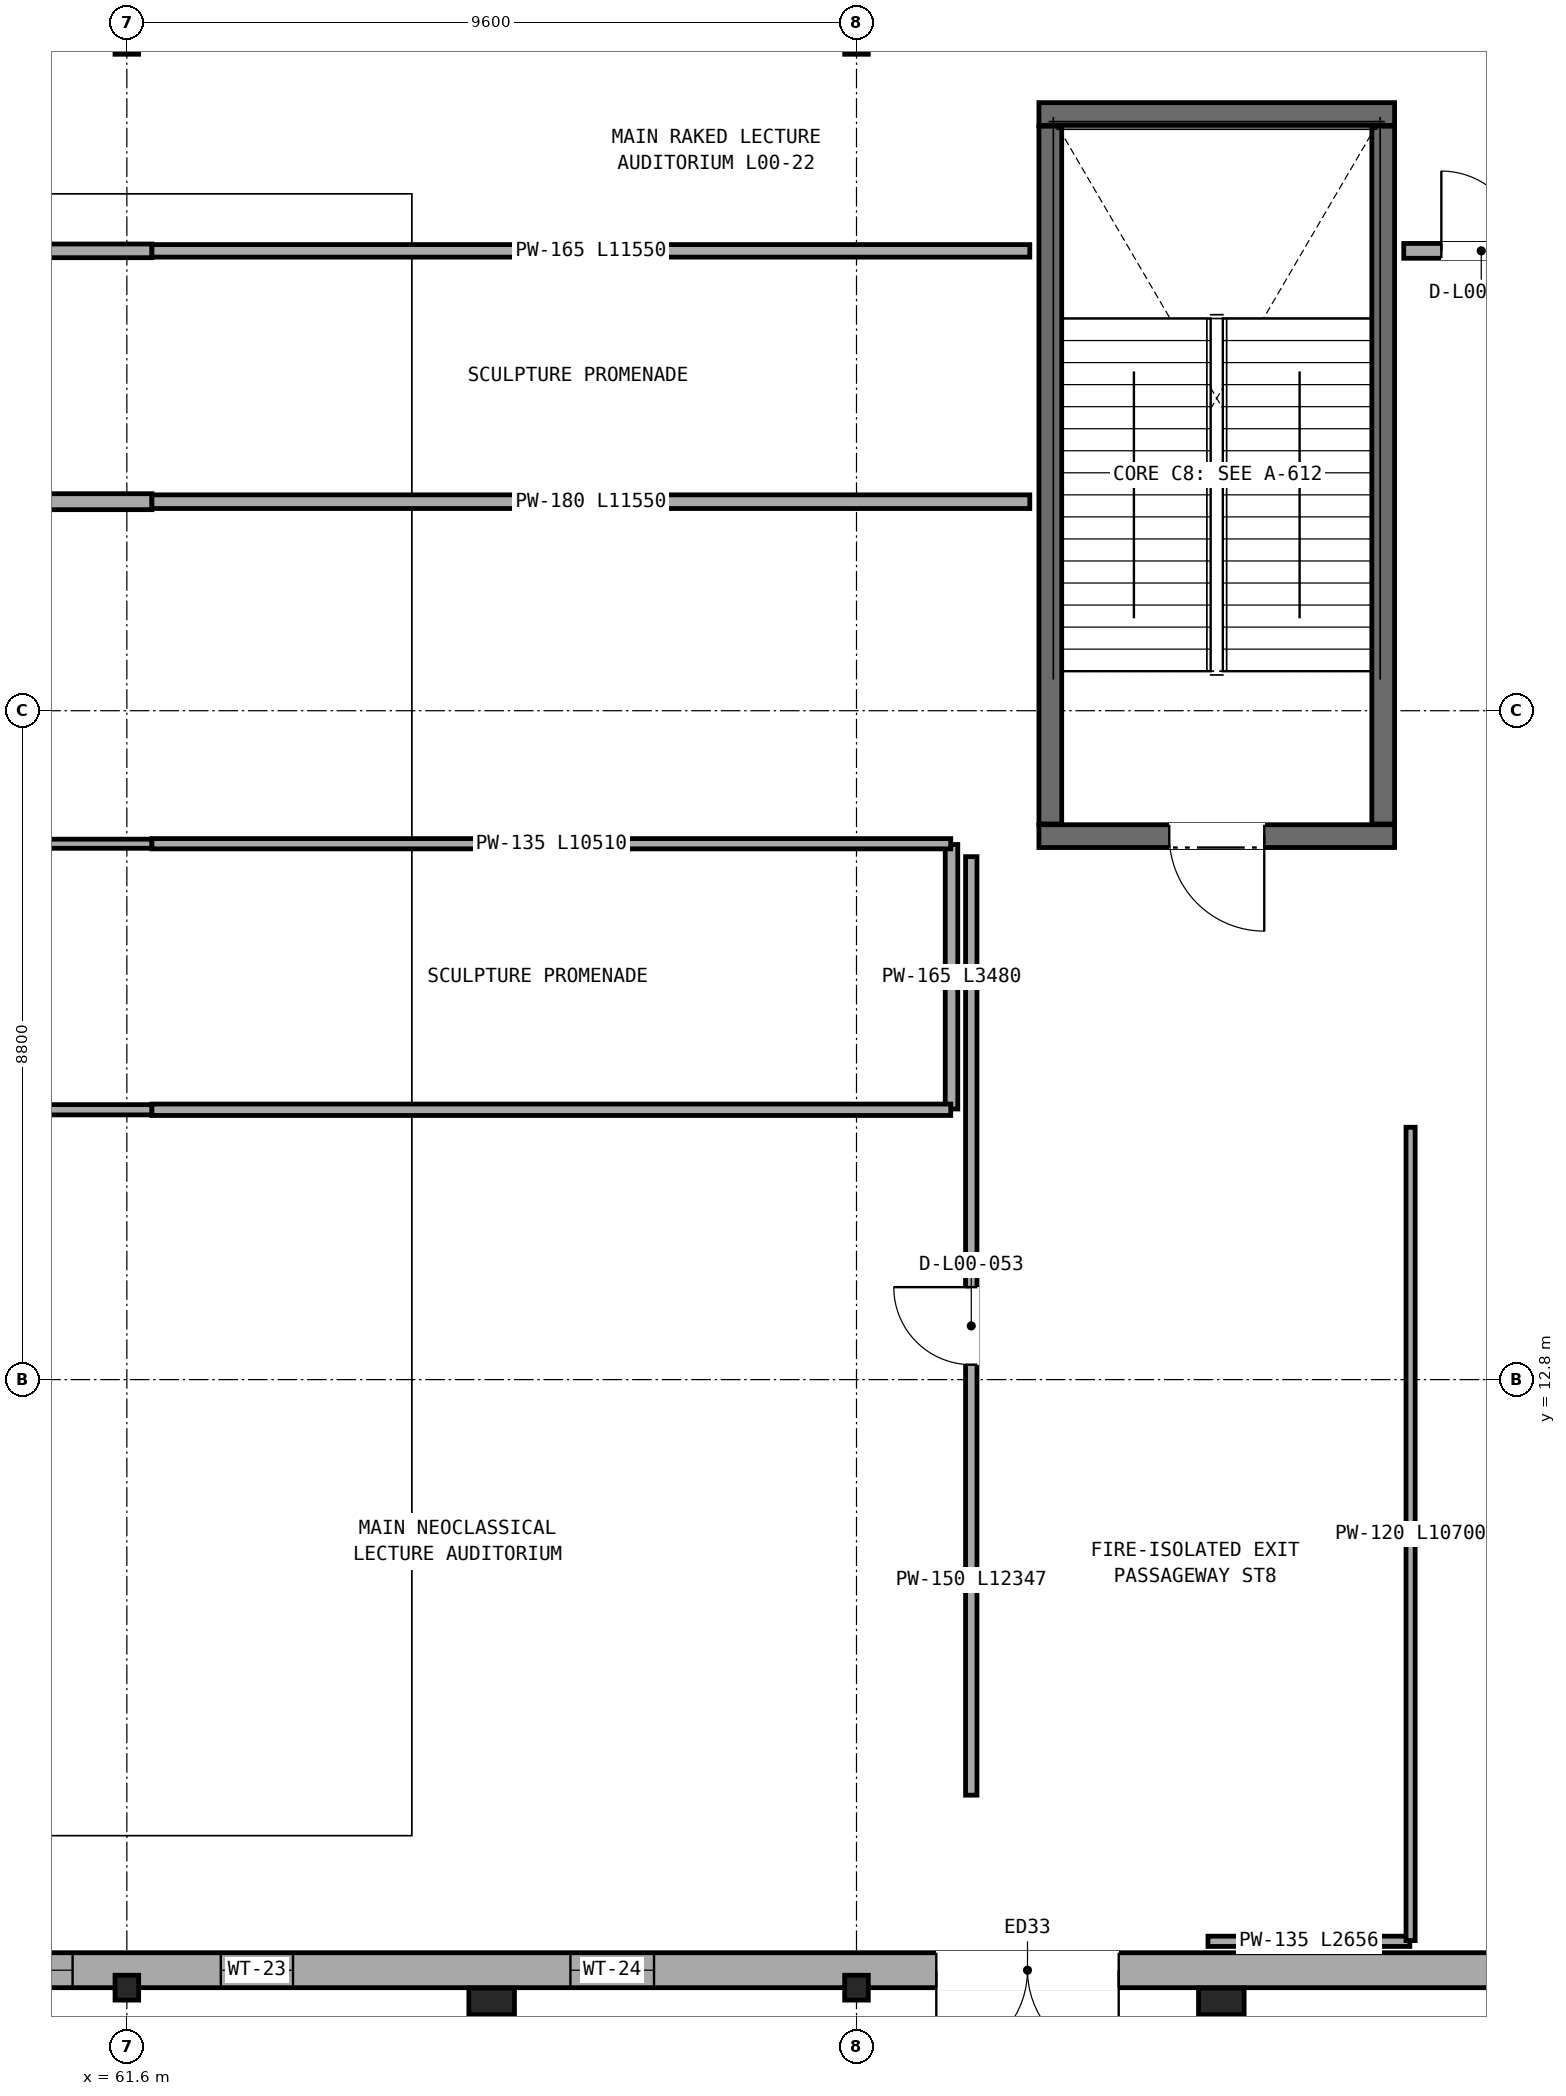
"""IFC4 building model, lengths in metres.
Left out: names, types, materials, properties, quantities, classifications, styles, units other than length and angle.
Written with IfcOpenShell. Run it as: python <this file> out.ifc"""

import sys

from ifc_helpers import new_model, si_unit, direction, frame, frame_2d, origin, origin_2d, place, context, subcontext, project, spatial, rectangle, i_section, extrude, element, fill, save


model = new_model("IFC4")
c1 = context("Model", 3, precision=1e-05, world=origin(), true_north=direction((0.0, 1.0)))
c2 = subcontext(c1, "Body", "Model", "MODEL_VIEW")
j1 = project(units=[si_unit("LENGTHUNIT", "METRE"), si_unit("PLANEANGLEUNIT", "RADIAN")], contexts=[c1])
p1 = place(None, origin())
s1 = spatial("IfcSite", under=j1, at=p1, CompositionType="ELEMENT")
p2 = place(p1, origin())
s2 = spatial("IfcBuilding", under=s1, at=p2, CompositionType="ELEMENT")
p3 = place(p2, origin())
s3 = spatial("IfcBuildingStorey", under=s2, at=p3, CompositionType="ELEMENT", Elevation=0.0)
for number, where, z_axis, x_axis in (
    (1, (61.6, 4.8, 0.0), (0.0, 0.0, 1.0), (1.0, 0.0, 0.0)),
    (2, (61.6, 30.4, 0.0), (0.0, 0.0, 1.0), (1.0, 0.0, 0.0)),
    (3, (71.2, 4.8, 0.0), (0.0, 0.0, 1.0), (1.0, 0.0, 0.0)),
    (4, (71.2, 30.4, 0.0), (0.0, 0.0, 1.0), (1.0, 0.0, 0.0)),
):
    element("IfcColumn", number, at=place(p3, frame(where, z_axis=z_axis, x_axis=x_axis)), inside=s3, PredefinedType="COLUMN", context=c2, shape_type="SweptSolid", body=[
        extrude(i_section(OverallWidth=0.311, OverallDepth=0.327, WebThickness=0.016, FlangeThickness=0.025, FilletRadius=0.017, at=origin_2d()), origin(), (0.0, 0.0, 1.0), 5.6),
    ])
for number, where, z_axis, x_axis in (
    (5, (66.4, 4.62, 0.0), (0.0, 0.0, 1.0), (1.0, 0.0, 0.0)),
    (6, (76.0, 4.62, 0.0), (0.0, 0.0, 1.0), (1.0, 0.0, 0.0)),
):
    element("IfcColumn", number, at=place(p3, frame(where, z_axis=z_axis, x_axis=x_axis)), inside=s3, PredefinedType="PILASTER", context=c2, shape_type="SweptSolid", body=[
        extrude(rectangle(XDim=0.6, YDim=0.35, at=origin_2d()), origin(), (0.0, 0.0, 1.0), 5.6),
    ])
p4 = place(p3, frame((42.636, 5.03, 0.0), z_axis=(0.0, 0.0, 1.0), x_axis=(1.0, 0.0, 0.0)))
e7 = element("IfcWall", 7, at=p4, inside=s3, PredefinedType="SOLIDWALL", context=c2, shape_type="SweptSolid", body=[
    extrude(rectangle(XDim=37.928, YDim=0.46, at=frame_2d((18.964, 0.0))), origin(), (0.0, 0.0, 1.0), 4.802),
])
p5 = place(p4, frame((29.614, 0.0, 0.0)))
e8 = element("IfcOpeningElement", 8, at=p5, cuts=e7, PredefinedType="OPENING", context=c2, shape_type="SweptSolid", body=[
    extrude(rectangle(XDim=2.4, YDim=2.45, at=frame_2d((1.2, 1.225))), frame((0.0, 0.24, 0.0), z_axis=(0.0, -1.0, 0.0), x_axis=(1.0, 0.0, 0.0)), (0.0, 0.0, 1.0), 0.48),
])
p6 = place(p4, frame((1.8, 0.0, 0.9)))
e9 = element("IfcOpeningElement", 9, at=p6, cuts=e7, PredefinedType="OPENING", context=c2, shape_type="SweptSolid", body=[
    extrude(rectangle(XDim=2.12, YDim=1.85, at=frame_2d((1.06, 0.925))), frame((0.0, 0.24, 0.0), z_axis=(0.0, -1.0, 0.0), x_axis=(1.0, 0.0, 0.0)), (0.0, 0.0, 1.0), 0.48),
])
p7 = place(p4, frame((6.4, 0.0, 0.9)))
e10 = element("IfcOpeningElement", 10, at=p7, cuts=e7, PredefinedType="OPENING", context=c2, shape_type="SweptSolid", body=[
    extrude(rectangle(XDim=2.2, YDim=1.85, at=frame_2d((1.1, 0.925))), frame((0.0, 0.24, 0.0), z_axis=(0.0, -1.0, 0.0), x_axis=(1.0, 0.0, 0.0)), (0.0, 0.0, 1.0), 0.48),
])
p8 = place(p4, frame((11.0, 0.0, 0.9)))
e11 = element("IfcOpeningElement", 11, at=p8, cuts=e7, PredefinedType="OPENING", context=c2, shape_type="SweptSolid", body=[
    extrude(rectangle(XDim=2.4, YDim=1.85, at=frame_2d((1.2, 0.925))), frame((0.0, 0.24, 0.0), z_axis=(0.0, -1.0, 0.0), x_axis=(1.0, 0.0, 0.0)), (0.0, 0.0, 1.0), 0.48),
])
p9 = place(p4, frame((15.6, 0.0, 0.9)))
e12 = element("IfcOpeningElement", 12, at=p9, cuts=e7, PredefinedType="OPENING", context=c2, shape_type="SweptSolid", body=[
    extrude(rectangle(XDim=2.65, YDim=1.85, at=frame_2d((1.325, 0.925))), frame((0.0, 0.24, 0.0), z_axis=(0.0, -1.0, 0.0), x_axis=(1.0, 0.0, 0.0)), (0.0, 0.0, 1.0), 0.48),
])
p10 = place(p4, frame((20.2, 0.0, 0.9)))
e13 = element("IfcOpeningElement", 13, at=p10, cuts=e7, PredefinedType="OPENING", context=c2, shape_type="SweptSolid", body=[
    extrude(rectangle(XDim=0.95, YDim=2.15, at=frame_2d((0.475, 1.075))), frame((0.0, 0.24, 0.0), z_axis=(0.0, -1.0, 0.0), x_axis=(1.0, 0.0, 0.0)), (0.0, 0.0, 1.0), 0.48),
])
p11 = place(p4, frame((24.8, 0.0, 0.9)))
e14 = element("IfcOpeningElement", 14, at=p11, cuts=e7, PredefinedType="OPENING", context=c2, shape_type="SweptSolid", body=[
    extrude(rectangle(XDim=1.1, YDim=2.15, at=frame_2d((0.55, 1.075))), frame((0.0, 0.24, 0.0), z_axis=(0.0, -1.0, 0.0), x_axis=(1.0, 0.0, 0.0)), (0.0, 0.0, 1.0), 0.48),
])
p12 = place(p3, frame((73.6, 19.95, 0.0), z_axis=(0.0, 0.0, 1.0), x_axis=(1.0, 0.0, 0.0)))
e15 = element("IfcWall", 15, at=p12, inside=s3, PredefinedType="SHEAR", context=c2, shape_type="SweptSolid", body=[
    extrude(rectangle(XDim=4.68, YDim=0.3, at=frame_2d((2.34, 0.0))), origin(), (0.0, 0.0, 1.0), 5.345),
])
p13 = place(p12, frame((1.715, 0.0, 0.0)))
e16 = element("IfcOpeningElement", 16, at=p13, cuts=e15, PredefinedType="OPENING", context=c2, shape_type="SweptSolid", body=[
    extrude(rectangle(XDim=1.25, YDim=2.2, at=frame_2d((0.625, 1.1))), frame((0.0, 0.16, 0.0), z_axis=(0.0, -1.0, 0.0), x_axis=(1.0, 0.0, 0.0)), (0.0, 0.0, 1.0), 0.32),
])
p14 = place(p3, frame((78.28, 29.45, 0.0), z_axis=(0.0, 0.0, 1.0), x_axis=(-1.0, 0.0, 0.0)))
e17 = element("IfcWall", 17, at=p14, inside=s3, PredefinedType="SHEAR", context=c2, shape_type="SweptSolid", body=[
    extrude(rectangle(XDim=4.68, YDim=0.3, at=frame_2d((2.34, 0.0))), origin(), (0.0, 0.0, 1.0), 5.345),
])
for number, where, z_axis, x_axis in (
    (18, (78.13, 20.11, 0.0), (0.0, 0.0, 1.0), (0.0, 1.0, 0.0)),
    (19, (73.75, 29.29, 0.0), (0.0, 0.0, 1.0), (0.0, -1.0, 0.0)),
):
    element("IfcWall", number, at=place(p3, frame(where, z_axis=z_axis, x_axis=x_axis)), inside=s3, PredefinedType="SHEAR", context=c2, shape_type="SweptSolid", body=[
        extrude(rectangle(XDim=9.18, YDim=0.3, at=frame_2d((4.59, 0.0))), origin(), (0.0, 0.0, 1.0), 5.345),
    ])
p15 = place(p3, frame((72.45, 16.36, 0.0), z_axis=(0.0, 0.0, 1.0), x_axis=(0.0, 1.0, 0.0)))
e20 = element("IfcWall", 20, at=p15, inside=s3, PredefinedType="PARTITIONING", context=c2, shape_type="SweptSolid", body=[
    extrude(rectangle(XDim=3.48, YDim=0.165, at=frame_2d((1.74, 0.0))), origin(), (0.0, 0.0, 1.0), 5.23),
])
p16 = place(p3, frame((72.71, 19.68, 0.0), z_axis=(0.0, 0.0, 1.0), x_axis=(0.0, -1.0, 0.0)))
e21 = element("IfcWall", 21, at=p16, inside=s3, PredefinedType="PARTITIONING", context=c2, shape_type="SweptSolid", body=[
    extrude(rectangle(XDim=12.347, YDim=0.15, at=frame_2d((6.174, 0.0))), origin(), (0.0, 0.0, 1.0), 5.23),
])
p17 = place(p16, frame((5.664, 0.0, 0.0)))
e22 = element("IfcOpeningElement", 22, at=p17, cuts=e21, PredefinedType="OPENING", context=c2, shape_type="SweptSolid", body=[
    extrude(rectangle(XDim=1.02, YDim=2.24, at=frame_2d((0.51, 1.12))), frame((0.0, 0.085, 0.0), z_axis=(0.0, -1.0, 0.0), x_axis=(1.0, 0.0, 0.0)), (0.0, 0.0, 1.0), 0.17),
])
p18 = place(p3, frame((75.824, 5.41, 0.0), z_axis=(0.0, 0.0, 1.0), x_axis=(1.0, 0.0, 0.0)))
e23 = element("IfcWall", 23, at=p18, inside=s3, PredefinedType="PARTITIONING", context=c2, shape_type="SweptSolid", body=[
    extrude(rectangle(XDim=2.656, YDim=0.135, at=frame_2d((1.328, 0.0))), origin(), (0.0, 0.0, 1.0), 5.23),
])
p19 = place(p3, frame((78.49, 5.42, 0.0), z_axis=(0.0, 0.0, 1.0), x_axis=(0.0, 1.0, 0.0)))
e24 = element("IfcWall", 24, at=p19, inside=s3, PredefinedType="PARTITIONING", context=c2, shape_type="SweptSolid", body=[
    extrude(rectangle(XDim=10.7, YDim=0.12, at=frame_2d((5.35, 0.0))), origin(), (0.0, 0.0, 1.0), 5.23),
])
p20 = place(p3, frame((42.76, 16.35, 0.0), z_axis=(0.0, 0.0, 1.0), x_axis=(1.0, 0.0, 0.0)))
e25 = element("IfcWall", 25, at=p20, inside=s3, PredefinedType="PARTITIONING", context=c2, shape_type="SweptSolid", body=[
    extrude(rectangle(XDim=19.17, YDim=0.135, at=frame_2d((9.585, 0.0))), origin(), (0.0, 0.0, 1.0), 5.23),
])
p21 = place(p3, frame((61.93, 19.85, 0.0), z_axis=(0.0, 0.0, 1.0), x_axis=(-1.0, 0.0, 0.0)))
e26 = element("IfcWall", 26, at=p21, inside=s3, PredefinedType="PARTITIONING", context=c2, shape_type="SweptSolid", body=[
    extrude(rectangle(XDim=19.17, YDim=0.12, at=frame_2d((9.585, 0.0))), origin(), (0.0, 0.0, 1.0), 5.23),
])
p22 = place(p3, frame((42.76, 24.35, 0.0), z_axis=(0.0, 0.0, 1.0), x_axis=(1.0, 0.0, 0.0)))
e27 = element("IfcWall", 27, at=p22, inside=s3, PredefinedType="PARTITIONING", context=c2, shape_type="SweptSolid", body=[
    extrude(rectangle(XDim=19.17, YDim=0.21, at=frame_2d((9.585, 0.0))), origin(), (0.0, 0.0, 1.0), 5.23),
])
p23 = place(p3, frame((80.44, 27.65, 0.0), z_axis=(0.0, 0.0, 1.0), x_axis=(-1.0, 0.0, 0.0)))
e28 = element("IfcWall", 28, at=p23, inside=s3, PredefinedType="PARTITIONING", context=c2, shape_type="SweptSolid", body=[
    extrude(rectangle(XDim=2.04, YDim=0.195, at=frame_2d((1.02, 0.0))), origin(), (0.0, 0.0, 1.0), 5.23),
])
p24 = place(p23, frame((0.495, 0.0, 0.0)))
e29 = element("IfcOpeningElement", 29, at=p24, cuts=e28, PredefinedType="OPENING", context=c2, shape_type="SweptSolid", body=[
    extrude(rectangle(XDim=1.05, YDim=2.15, at=frame_2d((0.525, 1.075))), frame((0.0, 0.107, 0.0), z_axis=(0.0, -1.0, 0.0), x_axis=(1.0, 0.0, 0.0)), (0.0, 0.0, 1.0), 0.215),
])
p25 = place(p3, frame((61.93, 27.65, 0.0), z_axis=(0.0, 0.0, 1.0), x_axis=(-1.0, 0.0, 0.0)))
e30 = element("IfcWall", 30, at=p25, inside=s3, PredefinedType="PARTITIONING", context=c2, shape_type="SweptSolid", body=[
    extrude(rectangle(XDim=19.17, YDim=0.18, at=frame_2d((9.585, 0.0))), origin(), (0.0, 0.0, 1.0), 5.23),
])
p26 = place(p3, frame((61.93, 24.35, 0.0), z_axis=(0.0, 0.0, 1.0), x_axis=(1.0, 0.0, 0.0)))
e31 = element("IfcWall", 31, at=p26, inside=s3, PredefinedType="PARTITIONING", context=c2, shape_type="SweptSolid", body=[
    extrude(rectangle(XDim=11.55, YDim=0.18, at=frame_2d((5.775, 0.0))), origin(), (0.0, 0.0, 1.0), 5.23),
])
p27 = place(p3, frame((73.48, 27.65, 0.0), z_axis=(0.0, 0.0, 1.0), x_axis=(-1.0, 0.0, 0.0)))
e32 = element("IfcWall", 32, at=p27, inside=s3, PredefinedType="PARTITIONING", context=c2, shape_type="SweptSolid", body=[
    extrude(rectangle(XDim=11.55, YDim=0.165, at=frame_2d((5.775, 0.0))), origin(), (0.0, 0.0, 1.0), 5.23),
])
p28 = place(p3, frame((61.93, 16.35, 0.0), z_axis=(0.0, 0.0, 1.0), x_axis=(1.0, 0.0, 0.0)))
e33 = element("IfcWall", 33, at=p28, inside=s3, PredefinedType="PARTITIONING", context=c2, shape_type="SweptSolid", body=[
    extrude(rectangle(XDim=10.51, YDim=0.15, at=frame_2d((5.255, 0.0))), origin(), (0.0, 0.0, 1.0), 5.23),
])
p29 = place(p3, frame((72.44, 19.85, 0.0), z_axis=(0.0, 0.0, 1.0), x_axis=(-1.0, 0.0, 0.0)))
e34 = element("IfcWall", 34, at=p29, inside=s3, PredefinedType="PARTITIONING", context=c2, shape_type="SweptSolid", body=[
    extrude(rectangle(XDim=10.51, YDim=0.135, at=frame_2d((5.255, 0.0))), origin(), (0.0, 0.0, 1.0), 5.23),
])
p30 = place(p5, frame((2.4, 0.0, 0.0), z_axis=(0.0, 0.0, 1.0), x_axis=(-1.0, 0.0, 0.0)))
e35 = element("IfcDoor", 35, at=p30, inside=s3, OperationType="DOUBLE_DOOR_SINGLE_SWING", PredefinedType="DOOR", context=c2, shape_type="SweptSolid", body=[
    extrude(rectangle(XDim=2.4, YDim=2.45, at=frame_2d((1.2, 1.225))), frame((0.0, 0.025, 0.0), z_axis=(0.0, -1.0, 0.0), x_axis=(1.0, 0.0, 0.0)), (0.0, 0.0, 1.0), 0.05),
])
fill(e8, e35)
p31 = place(p9, origin())
e36 = element("IfcWindow", 36, at=p31, inside=s3, PartitioningType="SINGLE_PANEL", PredefinedType="WINDOW", context=c2, shape_type="SweptSolid", body=[
    extrude(rectangle(XDim=2.65, YDim=1.85, at=frame_2d((1.325, 0.925))), frame((0.0, 0.03, 0.0), z_axis=(0.0, -1.0, 0.0), x_axis=(1.0, 0.0, 0.0)), (0.0, 0.0, 1.0), 0.06),
])
fill(e12, e36)
p32 = place(p10, origin())
e37 = element("IfcWindow", 37, at=p32, inside=s3, PartitioningType="SINGLE_PANEL", PredefinedType="WINDOW", context=c2, shape_type="SweptSolid", body=[
    extrude(rectangle(XDim=0.95, YDim=2.15, at=frame_2d((0.475, 1.075))), frame((0.0, 0.03, 0.0), z_axis=(0.0, -1.0, 0.0), x_axis=(1.0, 0.0, 0.0)), (0.0, 0.0, 1.0), 0.06),
])
fill(e13, e37)
p33 = place(p11, origin())
e38 = element("IfcWindow", 38, at=p33, inside=s3, PartitioningType="SINGLE_PANEL", PredefinedType="WINDOW", context=c2, shape_type="SweptSolid", body=[
    extrude(rectangle(XDim=1.1, YDim=2.15, at=frame_2d((0.55, 1.075))), frame((0.0, 0.03, 0.0), z_axis=(0.0, -1.0, 0.0), x_axis=(1.0, 0.0, 0.0)), (0.0, 0.0, 1.0), 0.06),
])
fill(e14, e38)
p34 = place(p13, frame((1.25, 0.0, 0.0), z_axis=(0.0, 0.0, 1.0), x_axis=(-1.0, 0.0, 0.0)))
e39 = element("IfcDoor", 39, at=p34, inside=s3, OperationType="SINGLE_SWING_RIGHT", PredefinedType="DOOR", context=c2, shape_type="SweptSolid", body=[
    extrude(rectangle(XDim=1.25, YDim=2.2, at=frame_2d((0.625, 1.1))), frame((0.0, 0.025, 0.0), z_axis=(0.0, -1.0, 0.0), x_axis=(1.0, 0.0, 0.0)), (0.0, 0.0, 1.0), 0.05),
])
fill(e16, e39)
p35 = place(p17, frame((1.02, 0.0, 0.0), z_axis=(0.0, 0.0, 1.0), x_axis=(-1.0, 0.0, 0.0)))
e40 = element("IfcDoor", 40, at=p35, inside=s3, OperationType="SINGLE_SWING_LEFT", PredefinedType="DOOR", context=c2, shape_type="SweptSolid", body=[
    extrude(rectangle(XDim=1.02, YDim=2.24, at=frame_2d((0.51, 1.12))), frame((0.0, 0.025, 0.0), z_axis=(0.0, -1.0, 0.0), x_axis=(1.0, 0.0, 0.0)), (0.0, 0.0, 1.0), 0.05),
])
fill(e22, e40)
p36 = place(p24, frame((1.05, 0.0, 0.0), z_axis=(0.0, 0.0, 1.0), x_axis=(-1.0, 0.0, 0.0)))
e41 = element("IfcDoor", 41, at=p36, inside=s3, OperationType="SINGLE_SWING_RIGHT", PredefinedType="DOOR", context=c2, shape_type="SweptSolid", body=[
    extrude(rectangle(XDim=1.05, YDim=2.15, at=frame_2d((0.525, 1.075))), frame((0.0, 0.025, 0.0), z_axis=(0.0, -1.0, 0.0), x_axis=(1.0, 0.0, 0.0)), (0.0, 0.0, 1.0), 0.05),
])
fill(e29, e41)
save(model, sys.argv[1])
